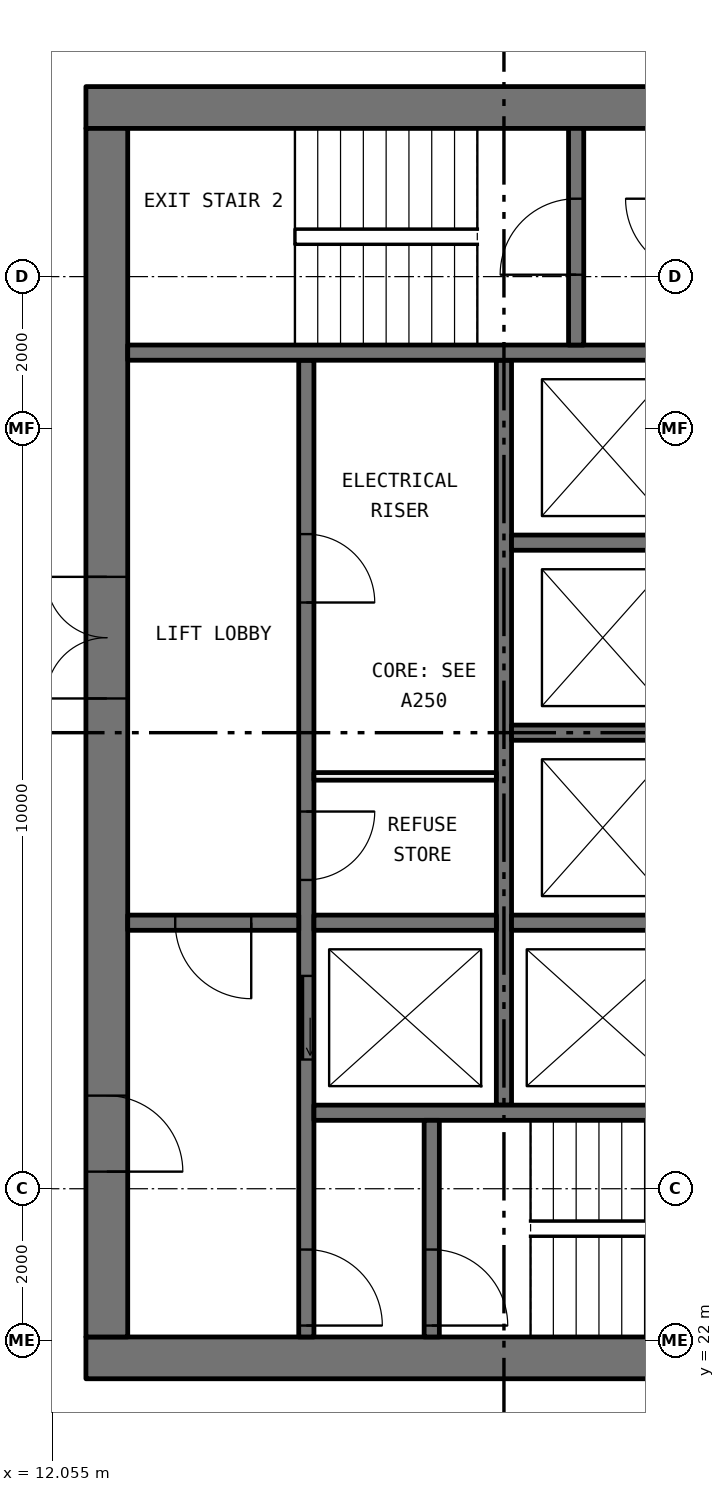
"""IFC4 building model, lengths in metres.
Left out: names, types, materials, properties, quantities, classifications, styles, units other than length and angle.
Written with IfcOpenShell. Run it as: python <this file> out.ifc"""

import sys

from ifc_helpers import new_model, si_unit, direction, frame, frame_2d, origin, place, context, subcontext, project, spatial, rectangle, extrude, element, fill, save


model = new_model("IFC4")
c1 = context("Model", 3, precision=1e-05, world=origin(), true_north=direction((0.0, 1.0)))
c2 = subcontext(c1, "Body", "Model", "MODEL_VIEW")
j1 = project(units=[si_unit("LENGTHUNIT", "METRE"), si_unit("PLANEANGLEUNIT", "RADIAN")], contexts=[c1])
p1 = place(None, origin())
s1 = spatial("IfcSite", under=j1, at=p1, CompositionType="ELEMENT")
p2 = place(p1, origin())
s2 = spatial("IfcBuilding", under=s1, at=p2, CompositionType="ELEMENT")
p3 = place(p2, frame((0.0, 0.0, 185.85)))
s3 = spatial("IfcBuildingStorey", under=s2, at=p3, CompositionType="ELEMENT", Elevation=185.85)
p4 = place(p3, frame((12.5, 21.775, 0.0), z_axis=(0.0, 0.0, 1.0), x_axis=(1.0, 0.0, 0.0)))
e1 = element("IfcWall", 1, at=p4, inside=s3, PredefinedType="SHEAR", context=c2, shape_type="SweptSolid", body=[
    extrude(rectangle(XDim=11.0, YDim=0.55, at=frame_2d((5.5, 0.0))), origin(), (0.0, 0.0, 1.0), 3.05),
])
p5 = place(p3, frame((12.5, 38.225, 0.0), z_axis=(0.0, 0.0, 1.0), x_axis=(1.0, 0.0, 0.0)))
e2 = element("IfcWall", 2, at=p5, inside=s3, PredefinedType="SHEAR", context=c2, shape_type="SweptSolid", body=[
    extrude(rectangle(XDim=11.0, YDim=0.55, at=frame_2d((5.5, 0.0))), origin(), (0.0, 0.0, 1.0), 3.05),
])
p6 = place(p5, frame((8.525, 0.0, 0.0)))
e3 = element("IfcOpeningElement", 3, at=p6, cuts=e2, PredefinedType="OPENING", context=c2, shape_type="SweptSolid", body=[
    extrude(rectangle(XDim=1.6, YDim=2.1, at=frame_2d((0.8, 1.05))), frame((0.0, 0.285, 0.0), z_axis=(0.0, -1.0, 0.0), x_axis=(1.0, 0.0, 0.0)), (0.0, 0.0, 1.0), 0.57),
])
p7 = place(p3, frame((12.775, 22.05, 0.0), z_axis=(0.0, 0.0, 1.0), x_axis=(0.0, 1.0, 0.0)))
e4 = element("IfcWall", 4, at=p7, inside=s3, PredefinedType="SHEAR", context=c2, shape_type="SweptSolid", body=[
    extrude(rectangle(XDim=15.9, YDim=0.55, at=frame_2d((7.95, 0.0))), origin(), (0.0, 0.0, 1.0), 3.05),
])
p8 = place(p7, frame((8.4, 0.0, 0.0)))
e5 = element("IfcOpeningElement", 5, at=p8, cuts=e4, PredefinedType="OPENING", context=c2, shape_type="SweptSolid", body=[
    extrude(rectangle(XDim=1.6, YDim=2.1, at=frame_2d((0.8, 1.05))), frame((0.0, 0.285, 0.0), z_axis=(0.0, -1.0, 0.0), x_axis=(1.0, 0.0, 0.0)), (0.0, 0.0, 1.0), 0.57),
])
p9 = place(p7, frame((2.175, 0.0, 0.0)))
e6 = element("IfcOpeningElement", 6, at=p9, cuts=e4, PredefinedType="OPENING", context=c2, shape_type="SweptSolid", body=[
    extrude(rectangle(XDim=1.0, YDim=2.1, at=frame_2d((0.5, 1.05))), frame((0.0, 0.285, 0.0), z_axis=(0.0, -1.0, 0.0), x_axis=(1.0, 0.0, 0.0)), (0.0, 0.0, 1.0), 0.57),
])
p10 = place(p3, frame((15.4, 22.05, 0.0), z_axis=(0.0, 0.0, 1.0), x_axis=(0.0, 1.0, 0.0)))
e7 = element("IfcWall", 7, at=p10, inside=s3, PredefinedType="SOLIDWALL", context=c2, shape_type="SweptSolid", body=[
    extrude(rectangle(XDim=12.85, YDim=0.2, at=frame_2d((6.425, 0.0))), origin(), (0.0, 0.0, 1.0), 3.05),
])
p11 = place(p10, frame((3.65, 0.0, 0.0)))
e8 = element("IfcOpeningElement", 8, at=p11, cuts=e7, PredefinedType="OPENING", context=c2, shape_type="SweptSolid", body=[
    extrude(rectangle(XDim=1.1, YDim=2.1, at=frame_2d((0.55, 1.05))), frame((0.0, 0.11, 0.0), z_axis=(0.0, -1.0, 0.0), x_axis=(1.0, 0.0, 0.0)), (0.0, 0.0, 1.0), 0.22),
])
p12 = place(p10, frame((0.15, 0.0, 0.0)))
e9 = element("IfcOpeningElement", 9, at=p12, cuts=e7, PredefinedType="OPENING", context=c2, shape_type="SweptSolid", body=[
    extrude(rectangle(XDim=1.0, YDim=2.1, at=frame_2d((0.5, 1.05))), frame((0.0, 0.11, 0.0), z_axis=(0.0, -1.0, 0.0), x_axis=(1.0, 0.0, 0.0)), (0.0, 0.0, 1.0), 0.22),
])
p13 = place(p10, frame((6.012, 0.0, 0.0)))
e10 = element("IfcOpeningElement", 10, at=p13, cuts=e7, PredefinedType="OPENING", context=c2, shape_type="SweptSolid", body=[
    extrude(rectangle(XDim=0.9, YDim=2.1, at=frame_2d((0.45, 1.05))), frame((0.0, 0.11, 0.0), z_axis=(0.0, -1.0, 0.0), x_axis=(1.0, 0.0, 0.0)), (0.0, 0.0, 1.0), 0.22),
])
p14 = place(p10, frame((9.663, 0.0, 0.0)))
e11 = element("IfcOpeningElement", 11, at=p14, cuts=e7, PredefinedType="OPENING", context=c2, shape_type="SweptSolid", body=[
    extrude(rectangle(XDim=0.9, YDim=2.1, at=frame_2d((0.45, 1.05))), frame((0.0, 0.11, 0.0), z_axis=(0.0, -1.0, 0.0), x_axis=(1.0, 0.0, 0.0)), (0.0, 0.0, 1.0), 0.22),
])
p15 = place(p3, frame((18.0, 25.1, 0.0), z_axis=(0.0, 0.0, 1.0), x_axis=(0.0, 1.0, 0.0)))
e12 = element("IfcWall", 12, at=p15, inside=s3, PredefinedType="SOLIDWALL", context=c2, shape_type="SweptSolid", body=[
    extrude(rectangle(XDim=9.8, YDim=0.2, at=frame_2d((4.9, 0.0))), origin(), (0.0, 0.0, 1.0), 3.05),
])
for number, where, z_axis, x_axis in (
    (13, (15.5, 25.0, 0.0), (0.0, 0.0, 1.0), (1.0, 0.0, 0.0)),
    (14, (13.05, 35.0, 0.0), (0.0, 0.0, 1.0), (1.0, 0.0, 0.0)),
):
    element("IfcWall", number, at=place(p3, frame(where, z_axis=z_axis, x_axis=x_axis)), inside=s3, PredefinedType="SOLIDWALL", context=c2, shape_type="SweptSolid", body=[
        extrude(rectangle(XDim=7.45, YDim=0.2, at=frame_2d((3.725, 0.0))), origin(), (0.0, 0.0, 1.0), 3.05),
    ])
p16 = place(p3, frame((13.05, 27.5, 0.0), z_axis=(0.0, 0.0, 1.0), x_axis=(1.0, 0.0, 0.0)))
e15 = element("IfcWall", 15, at=p16, inside=s3, PredefinedType="SOLIDWALL", context=c2, shape_type="SweptSolid", body=[
    extrude(rectangle(XDim=2.25, YDim=0.2, at=frame_2d((1.125, 0.0))), origin(), (0.0, 0.0, 1.0), 3.05),
])
p17 = place(p16, frame((0.625, 0.0, 0.0)))
e16 = element("IfcOpeningElement", 16, at=p17, cuts=e15, PredefinedType="OPENING", context=c2, shape_type="SweptSolid", body=[
    extrude(rectangle(XDim=1.0, YDim=2.1, at=frame_2d((0.5, 1.05))), frame((0.0, 0.11, 0.0), z_axis=(0.0, -1.0, 0.0), x_axis=(1.0, 0.0, 0.0)), (0.0, 0.0, 1.0), 0.22),
])
p18 = place(p3, frame((17.05, 22.05, 0.0), z_axis=(0.0, 0.0, 1.0), x_axis=(0.0, 1.0, 0.0)))
e17 = element("IfcWall", 17, at=p18, inside=s3, PredefinedType="SOLIDWALL", context=c2, shape_type="SweptSolid", body=[
    extrude(rectangle(XDim=2.85, YDim=0.2, at=frame_2d((1.425, 0.0))), origin(), (0.0, 0.0, 1.0), 3.05),
])
p19 = place(p18, frame((0.15, 0.0, 0.0)))
e18 = element("IfcOpeningElement", 18, at=p19, cuts=e17, PredefinedType="OPENING", context=c2, shape_type="SweptSolid", body=[
    extrude(rectangle(XDim=1.0, YDim=2.1, at=frame_2d((0.5, 1.05))), frame((0.0, 0.11, 0.0), z_axis=(0.0, -1.0, 0.0), x_axis=(1.0, 0.0, 0.0)), (0.0, 0.0, 1.0), 0.22),
])
p20 = place(p3, frame((18.95, 35.1, 0.0), z_axis=(0.0, 0.0, 1.0), x_axis=(0.0, 1.0, 0.0)))
e19 = element("IfcWall", 19, at=p20, inside=s3, PredefinedType="SOLIDWALL", context=c2, shape_type="SweptSolid", body=[
    extrude(rectangle(XDim=2.85, YDim=0.2, at=frame_2d((1.425, 0.0))), origin(), (0.0, 0.0, 1.0), 3.05),
])
p21 = place(p20, frame((0.925, 0.0, 0.0)))
e20 = element("IfcOpeningElement", 20, at=p21, cuts=e19, PredefinedType="OPENING", context=c2, shape_type="SweptSolid", body=[
    extrude(rectangle(XDim=1.0, YDim=2.1, at=frame_2d((0.5, 1.05))), frame((0.0, 0.11, 0.0), z_axis=(0.0, -1.0, 0.0), x_axis=(1.0, 0.0, 0.0)), (0.0, 0.0, 1.0), 0.22),
])
for number, where, z_axis, x_axis in (
    (21, (15.5, 27.5, 0.0), (0.0, 0.0, 1.0), (1.0, 0.0, 0.0)),
    (22, (18.1, 27.5, 0.0), (0.0, 0.0, 1.0), (1.0, 0.0, 0.0)),
    (23, (18.1, 30.0, 0.0), (0.0, 0.0, 1.0), (1.0, 0.0, 0.0)),
    (24, (18.1, 32.5, 0.0), (0.0, 0.0, 1.0), (1.0, 0.0, 0.0)),
):
    element("IfcWall", number, at=place(p3, frame(where, z_axis=z_axis, x_axis=x_axis)), inside=s3, PredefinedType="SOLIDWALL", context=c2, shape_type="SweptSolid", body=[
        extrude(rectangle(XDim=2.4, YDim=0.2, at=frame_2d((1.2, 0.0))), origin(), (0.0, 0.0, 1.0), 3.05),
    ])
p22 = place(p3, frame((15.5, 29.425, 0.0), z_axis=(0.0, 0.0, 1.0), x_axis=(1.0, 0.0, 0.0)))
e25 = element("IfcWall", 25, at=p22, inside=s3, PredefinedType="PARTITIONING", context=c2, shape_type="SweptSolid", body=[
    extrude(rectangle(XDim=2.4, YDim=0.1, at=frame_2d((1.2, 0.0))), origin(), (0.0, 0.0, 1.0), 3.05),
])
p23 = place(p11, origin())
e26 = element("IfcDoor", 26, at=p23, inside=s3, OperationType="SLIDING_TO_LEFT", PredefinedType="DOOR", context=c2, shape_type="SweptSolid", body=[
    extrude(rectangle(XDim=1.1, YDim=2.1, at=frame_2d((0.55, 1.05))), frame((0.0, 0.025, 0.0), z_axis=(0.0, -1.0, 0.0), x_axis=(1.0, 0.0, 0.0)), (0.0, 0.0, 1.0), 0.05),
])
fill(e8, e26)
p24 = place(p19, frame((1.0, 0.0, 0.0), x_axis=(-1.0, 0.0, 0.0)))
e27 = element("IfcDoor", 27, at=p24, inside=s3, OperationType="SINGLE_SWING_LEFT", PredefinedType="DOOR", context=c2, shape_type="SweptSolid", body=[
    extrude(rectangle(XDim=1.0, YDim=2.1, at=frame_2d((0.5, 1.05))), frame((0.0, 0.025, 0.0), z_axis=(0.0, -1.0, 0.0), x_axis=(1.0, 0.0, 0.0)), (0.0, 0.0, 1.0), 0.05),
])
fill(e18, e27)
p25 = place(p12, frame((1.0, 0.0, 0.0), x_axis=(-1.0, 0.0, 0.0)))
e28 = element("IfcDoor", 28, at=p25, inside=s3, OperationType="SINGLE_SWING_LEFT", PredefinedType="DOOR", context=c2, shape_type="SweptSolid", body=[
    extrude(rectangle(XDim=1.0, YDim=2.1, at=frame_2d((0.5, 1.05))), frame((0.0, 0.025, 0.0), z_axis=(0.0, -1.0, 0.0), x_axis=(1.0, 0.0, 0.0)), (0.0, 0.0, 1.0), 0.05),
])
fill(e9, e28)
p26 = place(p21, origin())
e29 = element("IfcDoor", 29, at=p26, inside=s3, OperationType="SINGLE_SWING_RIGHT", PredefinedType="DOOR", context=c2, shape_type="SweptSolid", body=[
    extrude(rectangle(XDim=1.0, YDim=2.1, at=frame_2d((0.5, 1.05))), frame((0.0, 0.025, 0.0), z_axis=(0.0, -1.0, 0.0), x_axis=(1.0, 0.0, 0.0)), (0.0, 0.0, 1.0), 0.05),
])
fill(e20, e29)
p27 = place(p17, frame((1.0, 0.0, 0.0), x_axis=(-1.0, 0.0, 0.0)))
e30 = element("IfcDoor", 30, at=p27, inside=s3, OperationType="SINGLE_SWING_RIGHT", PredefinedType="DOOR", context=c2, shape_type="SweptSolid", body=[
    extrude(rectangle(XDim=1.0, YDim=2.1, at=frame_2d((0.5, 1.05))), frame((0.0, 0.025, 0.0), z_axis=(0.0, -1.0, 0.0), x_axis=(1.0, 0.0, 0.0)), (0.0, 0.0, 1.0), 0.05),
])
fill(e16, e30)
p28 = place(p8, origin())
e31 = element("IfcDoor", 31, at=p28, inside=s3, OperationType="DOUBLE_DOOR_SINGLE_SWING", PredefinedType="DOOR", context=c2, shape_type="SweptSolid", body=[
    extrude(rectangle(XDim=1.6, YDim=2.1, at=frame_2d((0.8, 1.05))), frame((0.0, 0.025, 0.0), z_axis=(0.0, -1.0, 0.0), x_axis=(1.0, 0.0, 0.0)), (0.0, 0.0, 1.0), 0.05),
])
fill(e5, e31)
p29 = place(p9, frame((1.0, 0.0, 0.0), x_axis=(-1.0, 0.0, 0.0)))
e32 = element("IfcDoor", 32, at=p29, inside=s3, OperationType="SINGLE_SWING_LEFT", PredefinedType="DOOR", context=c2, shape_type="SweptSolid", body=[
    extrude(rectangle(XDim=1.0, YDim=2.1, at=frame_2d((0.5, 1.05))), frame((0.0, 0.025, 0.0), z_axis=(0.0, -1.0, 0.0), x_axis=(1.0, 0.0, 0.0)), (0.0, 0.0, 1.0), 0.05),
])
fill(e6, e32)
p30 = place(p13, frame((0.9, 0.0, 0.0), x_axis=(-1.0, 0.0, 0.0)))
e33 = element("IfcDoor", 33, at=p30, inside=s3, OperationType="SINGLE_SWING_RIGHT", PredefinedType="DOOR", context=c2, shape_type="SweptSolid", body=[
    extrude(rectangle(XDim=0.9, YDim=2.1, at=frame_2d((0.45, 1.05))), frame((0.0, 0.025, 0.0), z_axis=(0.0, -1.0, 0.0), x_axis=(1.0, 0.0, 0.0)), (0.0, 0.0, 1.0), 0.05),
])
fill(e10, e33)
p31 = place(p14, frame((0.9, 0.0, 0.0), x_axis=(-1.0, 0.0, 0.0)))
e34 = element("IfcDoor", 34, at=p31, inside=s3, OperationType="SINGLE_SWING_LEFT", PredefinedType="DOOR", context=c2, shape_type="SweptSolid", body=[
    extrude(rectangle(XDim=0.9, YDim=2.1, at=frame_2d((0.45, 1.05))), frame((0.0, 0.025, 0.0), z_axis=(0.0, -1.0, 0.0), x_axis=(1.0, 0.0, 0.0)), (0.0, 0.0, 1.0), 0.05),
])
fill(e11, e34)
save(model, sys.argv[1])
